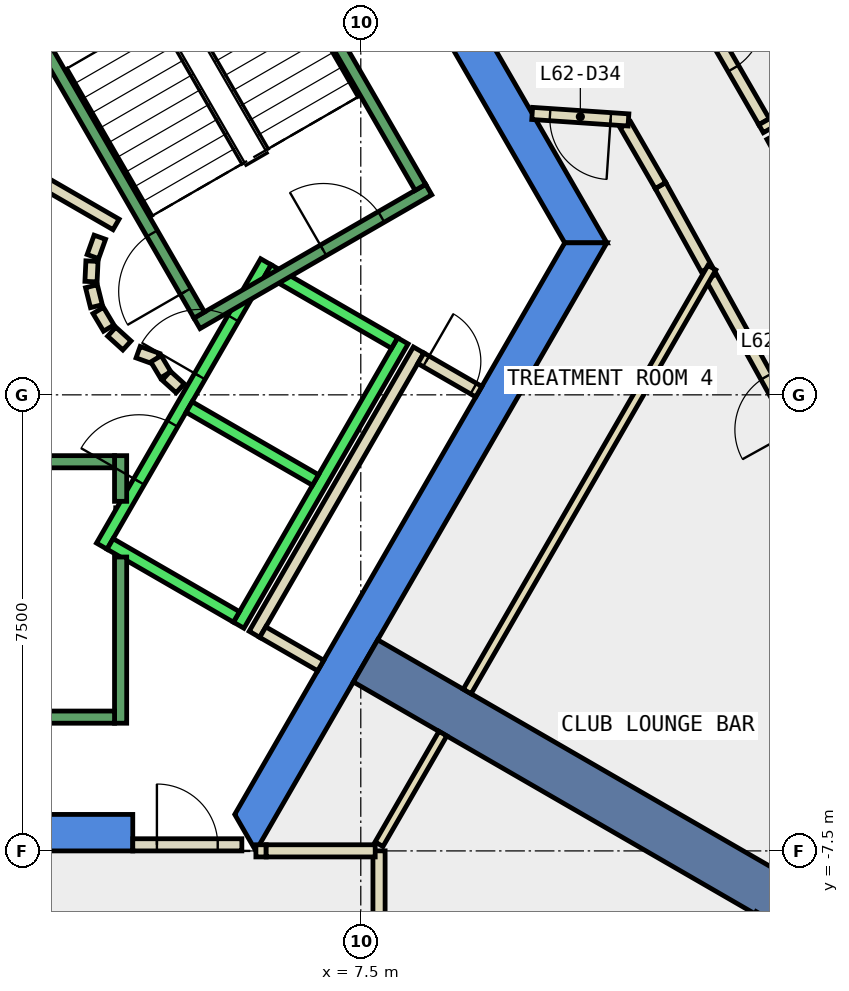
"""IFC4 building model, lengths in metres.
Left out: names, types, materials, properties, quantities, classifications, styles, units other than length and angle.
Written with IfcOpenShell. Run it as: python <this file> out.ifc"""

import sys

from ifc_helpers import new_model, si_unit, direction, frame, frame_2d, origin, place, context, subcontext, project, spatial, polyline, rectangle, outline, extrude, element, fill, save


model = new_model("IFC4")
c1 = context("Model", 3, precision=1e-05, world=origin(), true_north=direction((0.0, 1.0)))
c2 = subcontext(c1, "Body", "Model", "MODEL_VIEW")
j1 = project(units=[si_unit("LENGTHUNIT", "METRE"), si_unit("PLANEANGLEUNIT", "RADIAN")], contexts=[c1])
p1 = place(None, origin())
s1 = spatial("IfcSite", under=j1, at=p1, CompositionType="ELEMENT")
p2 = place(p1, origin())
s2 = spatial("IfcBuilding", under=s1, at=p2, CompositionType="ELEMENT")
p3 = place(p2, frame((0.0, 0.0, 270.2)))
s3 = spatial("IfcBuildingStorey", under=s2, at=p3, CompositionType="ELEMENT", Elevation=270.2)
p4 = place(p3, frame((0.0, 0.0, -0.34)))
e1 = element("IfcWall", 1, at=p4, inside=s3, PredefinedType="SHEAR", context=c2, shape_type="SweptSolid", body=[
    extrude(outline(polyline([(6.786, 10.747), (6.266, 10.447), (10.854, 2.5), (11.547, 2.5), (6.786, 10.747)])), origin(), (0.0, 0.0, 1.0), 3.6),
])
p5 = place(p3, frame((0.0, 0.0, -0.34)))
e2 = element("IfcWall", 2, at=p5, inside=s3, PredefinedType="SHEAR", context=c2, shape_type="SweptSolid", body=[
    extrude(outline(polyline([(3.75, -7.5), (3.75, -6.9), (-5.427, -6.9), (-5.774, -7.5), (3.75, -7.5)])), origin(), (0.0, 0.0, 1.0), 3.6),
])
p6 = place(p3, frame((0.0, 0.0, -0.34)))
e3 = element("IfcWall", 3, at=p6, inside=s3, PredefinedType="SHEAR", context=c2, shape_type="SweptSolid", body=[
    extrude(outline(polyline([(5.774, -7.5), (11.547, 2.5), (10.854, 2.5), (5.427, -6.9), (5.774, -7.5)])), origin(), (0.0, 0.0, 1.0), 3.6),
])
p7 = place(p3, frame((7.578, -4.375, -0.34), z_axis=(0.0, 0.0, 1.0), x_axis=(0.866024315419, -0.5000018851, 0.0)))
e4 = element("IfcWall", 4, at=p7, inside=s3, PredefinedType="SHEAR", context=c2, shape_type="SweptSolid", body=[
    extrude(rectangle(XDim=9.0, YDim=0.8, at=frame_2d((4.5, 0.0))), origin(), (0.0, 0.0, 1.0), 3.6),
])
p8 = place(p3, frame((13.188, 2.071, 0.0), z_axis=(0.0, 0.0, 1.0), x_axis=(-0.484398936474, 0.874847226859, 0.0)))
e5 = element("IfcWall", 5, at=p8, inside=s3, PredefinedType="PARTITIONING", context=c2, shape_type="SweptSolid", body=[
    extrude(rectangle(XDim=1.567, YDim=0.2, at=frame_2d((0.783, 0.0))), origin(), (0.0, 0.0, 1.0), 3.26),
])
p9 = place(p3, frame((12.429, 3.442, 0.0), z_axis=(0.0, 0.0, 1.0), x_axis=(-0.500076612374, 0.865981167091, 0.0)))
e6 = element("IfcWall", 6, at=p9, inside=s3, PredefinedType="PARTITIONING", context=c2, shape_type="SweptSolid", body=[
    extrude(rectangle(XDim=1.154, YDim=0.2, at=frame_2d((0.577, 0.0))), origin(), (0.0, 0.0, 1.0), 3.26),
])
p10 = place(p3, frame((11.902, 4.521, 0.0), z_axis=(0.0, 0.0, 1.0), x_axis=(-0.997726217037, 0.067397298437, 0.0)))
e7 = element("IfcWall", 7, at=p10, inside=s3, PredefinedType="PARTITIONING", context=c2, shape_type="SweptSolid", body=[
    extrude(rectangle(XDim=1.587, YDim=0.2, at=frame_2d((0.793, 0.0))), origin(), (0.0, 0.0, 1.0), 3.26),
])
p11 = place(p10, frame((0.293, 0.0, 0.0)))
e8 = element("IfcOpeningElement", 8, at=p11, cuts=e7, PredefinedType="OPENING", context=c2, shape_type="SweptSolid", body=[
    extrude(rectangle(XDim=1.0, YDim=2.1, at=frame_2d((0.5, 1.05))), frame((0.0, 0.11, 0.0), z_axis=(0.0, -1.0, 0.0), x_axis=(1.0, 0.0, 0.0)), (0.0, 0.0, 1.0), 0.22),
])
p12 = place(p3, frame((15.56, -2.214, 0.0), z_axis=(0.0, 0.0, 1.0), x_axis=(-0.484323615817, 0.874888927329, 0.0)))
e9 = element("IfcWall", 9, at=p12, inside=s3, PredefinedType="PARTITIONING", context=c2, shape_type="SweptSolid", body=[
    extrude(rectangle(XDim=4.747, YDim=0.2, at=frame_2d((2.374, 0.0))), origin(), (0.0, 0.0, 1.0), 3.26),
])
p13 = place(p12, frame((1.874, 0.0, 0.0)))
e10 = element("IfcOpeningElement", 10, at=p13, cuts=e9, PredefinedType="OPENING", context=c2, shape_type="SweptSolid", body=[
    extrude(rectangle(XDim=1.0, YDim=2.1, at=frame_2d((0.5, 1.05))), frame((0.0, 0.11, 0.0), z_axis=(0.0, -1.0, 0.0), x_axis=(1.0, 0.0, 0.0)), (0.0, 0.0, 1.0), 0.22),
])
p14 = place(p3, frame((14.267, 4.25, 0.0), z_axis=(0.0, 0.0, 1.0), x_axis=(0.4843920198, -0.874851056554, 0.0)))
e11 = element("IfcWall", 11, at=p14, inside=s3, PredefinedType="PARTITIONING", context=c2, shape_type="SweptSolid", body=[
    extrude(rectangle(XDim=3.199, YDim=0.2, at=frame_2d((1.6, 0.0))), origin(), (0.0, 0.0, 1.0), 3.26),
])
p15 = place(p3, frame((12.62, 7.111, 0.0), z_axis=(0.0, 0.0, 1.0), x_axis=(0.499950733426, -0.866053845986, 0.0)))
e12 = element("IfcWall", 12, at=p15, inside=s3, PredefinedType="PARTITIONING", context=c2, shape_type="SweptSolid", body=[
    extrude(rectangle(XDim=3.024, YDim=0.2, at=frame_2d((1.512, 0.0))), origin(), (0.0, 0.0, 1.0), 3.26),
])
p16 = place(p15, frame((1.013, 0.0, 0.0)))
e13 = element("IfcOpeningElement", 13, at=p16, cuts=e12, PredefinedType="OPENING", context=c2, shape_type="SweptSolid", body=[
    extrude(rectangle(XDim=1.0, YDim=2.1, at=frame_2d((0.5, 1.05))), frame((0.0, 0.11, 0.0), z_axis=(0.0, -1.0, 0.0), x_axis=(1.0, 0.0, 0.0)), (0.0, 0.0, 1.0), 0.22),
])
p17 = place(p3, frame((5.751, -3.938, 0.0), z_axis=(0.0, 0.0, 1.0), x_axis=(0.500034260056, 0.866005622828, 0.0)))
e14 = element("IfcWall", 14, at=p17, inside=s3, PredefinedType="PARTITIONING", context=c2, shape_type="SweptSolid", body=[
    extrude(rectangle(XDim=5.399, YDim=0.2, at=frame_2d((2.7, 0.0))), origin(), (0.0, 0.0, 1.0), 3.26),
])
p18 = place(p3, frame((8.488, 0.602, 0.0), z_axis=(0.0, 0.0, 1.0), x_axis=(0.866063652425, -0.499933745558, 0.0)))
e15 = element("IfcWall", 15, at=p18, inside=s3, PredefinedType="PARTITIONING", context=c2, shape_type="SweptSolid", body=[
    extrude(rectangle(XDim=1.1, YDim=0.2, at=frame_2d((0.55, 0.0))), origin(), (0.0, 0.0, 1.0), 3.26),
])
p19 = place(p18, frame((0.1, 0.0, 0.0)))
e16 = element("IfcOpeningElement", 16, at=p19, cuts=e15, PredefinedType="OPENING", context=c2, shape_type="SweptSolid", body=[
    extrude(rectangle(XDim=0.9, YDim=2.1, at=frame_2d((0.45, 1.05))), frame((0.0, 0.11, 0.0), z_axis=(0.0, -1.0, 0.0), x_axis=(1.0, 0.0, 0.0)), (0.0, 0.0, 1.0), 0.22),
])
p20 = place(p3, frame((6.841, -4.452, 0.0), z_axis=(0.0, 0.0, 1.0), x_axis=(-0.86621513555, 0.499671230855, 0.0)))
e17 = element("IfcWall", 17, at=p20, inside=s3, PredefinedType="PARTITIONING", context=c2, shape_type="SweptSolid", body=[
    extrude(rectangle(XDim=1.1, YDim=0.2, at=frame_2d((0.55, 0.0))), origin(), (0.0, 0.0, 1.0), 3.26),
])
p21 = place(p3, frame((5.775, -7.499, 0.0), z_axis=(0.0, 0.0, 1.0), x_axis=(1.0, 0.0, 0.0)))
e18 = element("IfcWall", 18, at=p21, inside=s3, PredefinedType="PARTITIONING", context=c2, shape_type="SweptSolid", body=[
    extrude(rectangle(XDim=0.169, YDim=0.2, at=frame_2d((0.084, 0.0))), origin(), (0.0, 0.0, 1.0), 2.4),
])
p22 = place(p3, frame((7.8, -7.39, 0.0), z_axis=(0.0, 0.0, 1.0), x_axis=(0.499977374825, 0.866038466041, 0.0)))
e19 = element("IfcWall", 19, at=p22, inside=s3, PredefinedType="PARTITIONING", context=c2, shape_type="SweptSolid", body=[
    extrude(rectangle(XDim=2.1, YDim=0.15, at=frame_2d((1.05, 0.0))), origin(), (0.0, 0.0, 1.0), 3.26),
])
p23 = place(p3, frame((1.866, 3.732, 0.0), z_axis=(0.0, 0.0, 1.0), x_axis=(0.866043361281, -0.499968895414, 0.0)))
e20 = element("IfcWall", 20, at=p23, inside=s3, PredefinedType="PARTITIONING", context=c2, shape_type="SweptSolid", body=[
    extrude(rectangle(XDim=1.858, YDim=0.2, at=frame_2d((0.929, 0.0))), origin(), (0.0, 0.0, 1.0), 3.26),
])
p24 = place(p3, frame((3.208, 2.592, 0.0), z_axis=(0.0, 0.0, 1.0), x_axis=(-0.337388820924, -0.941365382578, 0.0)))
e21 = element("IfcWall", 21, at=p24, inside=s3, PredefinedType="PARTITIONING", context=c2, shape_type="SweptSolid", body=[
    extrude(rectangle(XDim=0.338, YDim=0.2, at=frame_2d((0.169, 0.0))), origin(), (0.0, 0.0, 1.0), 3.26),
])
p25 = place(p3, frame((3.079, 2.199, 0.0), z_axis=(0.0, 0.0, 1.0), x_axis=(-0.047771483479, -0.998858290933, 0.0)))
e22 = element("IfcWall", 22, at=p25, inside=s3, PredefinedType="PARTITIONING", context=c2, shape_type="SweptSolid", body=[
    extrude(rectangle(XDim=0.337, YDim=0.2, at=frame_2d((0.169, 0.0))), origin(), (0.0, 0.0, 1.0), 3.26),
])
p26 = place(p3, frame((3.07, 1.786, 0.0), z_axis=(0.0, 0.0, 1.0), x_axis=(0.242705583207, -0.970099994784, 0.0)))
e23 = element("IfcWall", 23, at=p26, inside=s3, PredefinedType="PARTITIONING", context=c2, shape_type="SweptSolid", body=[
    extrude(rectangle(XDim=0.338, YDim=0.2, at=frame_2d((0.169, 0.0))), origin(), (0.0, 0.0, 1.0), 3.26),
])
for number, where, z_axis, x_axis in (
    (24, (3.182, 1.388, 0.0), (0.0, 0.0, 1.0), (0.512, -0.859, 0.0)),
    (25, (3.404, 1.039, 0.0), (0.0, 0.0, 1.0), (0.74, -0.672, 0.0)),
):
    element("IfcWall", number, at=place(p3, frame(where, z_axis=z_axis, x_axis=x_axis)), inside=s3, PredefinedType="PARTITIONING", context=c2, shape_type="SweptSolid", body=[
        extrude(rectangle(XDim=0.338, YDim=0.2, at=frame_2d((0.169, 0.0))), origin(), (0.0, 0.0, 1.0), 3.26),
    ])
p27 = place(p3, frame((3.838, 0.702, 0.0), z_axis=(0.0, 0.0, 1.0), x_axis=(0.941035081519, -0.338308993895, 0.0)))
e26 = element("IfcWall", 26, at=p27, inside=s3, PredefinedType="PARTITIONING", context=c2, shape_type="SweptSolid", body=[
    extrude(rectangle(XDim=0.337, YDim=0.2, at=frame_2d((0.168, 0.0))), origin(), (0.0, 0.0, 1.0), 3.26),
])
p28 = place(p3, frame((4.132, 0.593, 0.0), z_axis=(0.0, 0.0, 1.0), x_axis=(0.513561617048, -0.858052717201, 0.0)))
e27 = element("IfcWall", 27, at=p28, inside=s3, PredefinedType="PARTITIONING", context=c2, shape_type="SweptSolid", body=[
    extrude(rectangle(XDim=0.308, YDim=0.2, at=frame_2d((0.154, 0.0))), origin(), (0.0, 0.0, 1.0), 3.26),
])
p29 = place(p3, frame((4.301, 0.315, 0.0), z_axis=(0.0, 0.0, 1.0), x_axis=(0.741798017506, -0.670623367639, 0.0)))
e28 = element("IfcWall", 28, at=p29, inside=s3, PredefinedType="PARTITIONING", context=c2, shape_type="SweptSolid", body=[
    extrude(rectangle(XDim=0.309, YDim=0.2, at=frame_2d((0.154, 0.0))), origin(), (0.0, 0.0, 1.0), 3.26),
])
p30 = place(p3, frame((7.8, -7.499, 0.0), z_axis=(0.0, 0.0, 1.0), x_axis=(0.0, -1.0, 0.0)))
e29 = element("IfcWall", 29, at=p30, inside=s3, PredefinedType="PARTITIONING", context=c2, shape_type="SweptSolid", body=[
    extrude(rectangle(XDim=5.465, YDim=0.2, at=frame_2d((2.732, 0.0))), origin(), (0.0, 0.0, 1.0), 3.26),
])
p31 = place(p3, frame((14.067, -8.536, 0.0), z_axis=(0.0, 0.0, 1.0), x_axis=(-0.500100941679, -0.865967117235, 0.0)))
e30 = element("IfcWall", 30, at=p31, inside=s3, PredefinedType="PARTITIONING", context=c2, shape_type="SweptSolid", body=[
    extrude(rectangle(XDim=4.951, YDim=0.15, at=frame_2d((2.475, 0.0))), origin(), (0.0, 0.0, 1.0), 3.26),
])
p32 = place(p3, frame((14.083, 4.377, 0.0), z_axis=(0.0, 0.0, 1.0), x_axis=(0.870415885751, 0.492317159799, 0.0)))
e31 = element("IfcWall", 31, at=p32, inside=s3, PredefinedType="PARTITIONING", context=c2, shape_type="SweptSolid", body=[
    extrude(rectangle(XDim=4.581, YDim=0.15, at=frame_2d((2.29, 0.0))), origin(), (0.0, 0.0, 1.0), 3.26),
])
p33 = place(p3, frame((3.75, -7.4, 0.0), z_axis=(0.0, 0.0, 1.0), x_axis=(1.0, 0.0, 0.0)))
e32 = element("IfcWall", 32, at=p33, inside=s3, PredefinedType="PARTITIONING", context=c2, shape_type="SweptSolid", body=[
    extrude(rectangle(XDim=1.794, YDim=0.2, at=frame_2d((0.897, 0.0))), origin(), (0.0, 0.0, 1.0), 2.4),
])
p34 = place(p33, frame((0.397, 0.0, 0.0)))
e33 = element("IfcOpeningElement", 33, at=p34, cuts=e32, PredefinedType="OPENING", context=c2, shape_type="SweptSolid", body=[
    extrude(rectangle(XDim=1.0, YDim=2.1, at=frame_2d((0.5, 1.05))), frame((0.0, 0.11, 0.0), z_axis=(0.0, -1.0, 0.0), x_axis=(1.0, 0.0, 0.0)), (0.0, 0.0, 1.0), 0.22),
])
p35 = place(p3, frame((9.25, -4.878, 0.0), z_axis=(0.0, 0.0, 1.0), x_axis=(0.499982416899, 0.866035555154, 0.0)))
e34 = element("IfcWall", 34, at=p35, inside=s3, PredefinedType="PARTITIONING", context=c2, shape_type="SweptSolid", body=[
    extrude(rectangle(XDim=8.048, YDim=0.15, at=frame_2d((4.024, 0.0))), origin(), (0.0, 0.0, 1.0), 3.26),
])
p36 = place(p3, frame((5.944, -7.499, 0.0), z_axis=(0.0, 0.0, 1.0), x_axis=(1.0, 0.0, 0.0)))
e35 = element("IfcWall", 35, at=p36, inside=s3, PredefinedType="PARTITIONING", context=c2, shape_type="SweptSolid", body=[
    extrude(rectangle(XDim=1.793, YDim=0.2, at=frame_2d((0.896, 0.0))), origin(), (0.0, 0.0, 1.0), 3.26),
])
p37 = place(p3, frame((3.24, -2.488, 0.0), z_axis=(0.0, 0.0, 1.0), x_axis=(0.500034260056, 0.866005622828, 0.0)))
e36 = element("IfcWall", 36, at=p37, inside=s3, PredefinedType="STANDARD", context=c2, shape_type="SweptSolid", body=[
    extrude(rectangle(XDim=5.399, YDim=0.2, at=frame_2d((2.7, 0.0))), origin(), (0.0, 0.0, 1.0), 3.26),
])
p38 = place(p37, frame((3.225, 0.0, 0.0)))
e37 = element("IfcOpeningElement", 37, at=p38, cuts=e36, PredefinedType="OPENING", context=c2, shape_type="SweptSolid", body=[
    extrude(rectangle(XDim=1.1, YDim=2.1, at=frame_2d((0.55, 1.05))), frame((0.0, 0.11, 0.0), z_axis=(0.0, -1.0, 0.0), x_axis=(1.0, 0.0, 0.0)), (0.0, 0.0, 1.0), 0.22),
])
p39 = place(p37, frame((1.225, 0.0, 0.0)))
e38 = element("IfcOpeningElement", 38, at=p39, cuts=e36, PredefinedType="OPENING", context=c2, shape_type="SweptSolid", body=[
    extrude(rectangle(XDim=1.1, YDim=2.1, at=frame_2d((0.55, 1.05))), frame((0.0, 0.11, 0.0), z_axis=(0.0, -1.0, 0.0), x_axis=(1.0, 0.0, 0.0)), (0.0, 0.0, 1.0), 0.22),
])
p40 = place(p3, frame((5.492, -3.788, 0.0), z_axis=(0.0, 0.0, 1.0), x_axis=(0.500034260056, 0.866005622828, 0.0)))
e39 = element("IfcWall", 39, at=p40, inside=s3, PredefinedType="STANDARD", context=c2, shape_type="SweptSolid", body=[
    extrude(rectangle(XDim=5.399, YDim=0.2, at=frame_2d((2.7, 0.0))), origin(), (0.0, 0.0, 1.0), 3.26),
])
p41 = place(p3, frame((3.377, -2.452, 0.0), z_axis=(0.0, 0.0, 1.0), x_axis=(0.865955154139, -0.50012165622, 0.0)))
e40 = element("IfcWall", 40, at=p41, inside=s3, PredefinedType="STANDARD", context=c2, shape_type="SweptSolid", body=[
    extrude(rectangle(XDim=2.4, YDim=0.2, at=frame_2d((1.2, 0.0))), origin(), (0.0, 0.0, 1.0), 3.26),
])
for number, where, z_axis, x_axis in (
    (41, (4.677, -0.2, 0.0), (0.0, 0.0, 1.0), (0.866, -0.5, 0.0)),
    (42, (5.977, 2.052, 0.0), (0.0, 0.0, 1.0), (0.866, -0.5, 0.0)),
):
    element("IfcWall", number, at=place(p3, frame(where, z_axis=z_axis, x_axis=x_axis)), inside=s3, PredefinedType="STANDARD", context=c2, shape_type="SweptSolid", body=[
        extrude(rectangle(XDim=2.399, YDim=0.2, at=frame_2d((1.2, 0.0))), origin(), (0.0, 0.0, 1.0), 3.26),
    ])
p42 = place(p3, frame((3.55, -2.667, 0.0), z_axis=(0.0, 0.0, 1.0), x_axis=(0.0, -1.0, 0.0)))
e43 = element("IfcWall", 43, at=p42, inside=s3, PredefinedType="STANDARD", context=c2, shape_type="SweptSolid", body=[
    extrude(rectangle(XDim=2.733, YDim=0.2, at=frame_2d((1.366, 0.0))), origin(), (0.0, 0.0, 1.0), 3.26),
])
p43 = place(p3, frame((3.55, -1.0, 0.0), z_axis=(0.0, 0.0, 1.0), x_axis=(0.0, -1.0, 0.0)))
e44 = element("IfcWall", 44, at=p43, inside=s3, PredefinedType="STANDARD", context=c2, shape_type="SweptSolid", body=[
    extrude(rectangle(XDim=0.751, YDim=0.2, at=frame_2d((0.375, 0.0))), origin(), (0.0, 0.0, 1.0), 3.26),
])
p44 = place(p3, frame((-3.45, -1.1, 0.0), z_axis=(0.0, 0.0, 1.0), x_axis=(1.0, 0.0, 0.0)))
e45 = element("IfcWall", 45, at=p44, inside=s3, PredefinedType="STANDARD", context=c2, shape_type="SweptSolid", body=[
    extrude(rectangle(XDim=6.9, YDim=0.2, at=frame_2d((3.45, 0.0))), origin(), (0.0, 0.0, 1.0), 3.26),
])
p45 = place(p44, frame((0.45, 0.0, 0.0)))
e46 = element("IfcOpeningElement", 46, at=p45, cuts=e45, PredefinedType="OPENING", context=c2, shape_type="SweptSolid", body=[
    extrude(rectangle(XDim=1.1, YDim=2.2, at=frame_2d((0.55, 1.1))), frame((0.0, 0.11, 0.0), z_axis=(0.0, -1.0, 0.0), x_axis=(1.0, 0.0, 0.0)), (0.0, 0.0, 1.0), 0.22),
])
p46 = place(p3, frame((-3.45, -5.3, 0.0), z_axis=(0.0, 0.0, 1.0), x_axis=(1.0, 0.0, 0.0)))
e47 = element("IfcWall", 47, at=p46, inside=s3, PredefinedType="STANDARD", context=c2, shape_type="SweptSolid", body=[
    extrude(rectangle(XDim=6.9, YDim=0.2, at=frame_2d((3.45, 0.0))), origin(), (0.0, 0.0, 1.0), 3.26),
])
p47 = place(p3, frame((4.806, 1.176, 0.0), z_axis=(0.0, 0.0, 1.0), x_axis=(0.866059941101, 0.499940174841, 0.0)))
e48 = element("IfcWall", 48, at=p47, inside=s3, PredefinedType="STANDARD", context=c2, shape_type="SweptSolid", body=[
    extrude(rectangle(XDim=4.4, YDim=0.2, at=frame_2d((2.2, 0.0))), origin(), (0.0, 0.0, 1.0), 3.26),
])
p48 = place(p47, frame((2.4, 0.0, 0.0)))
e49 = element("IfcOpeningElement", 49, at=p48, cuts=e48, PredefinedType="OPENING", context=c2, shape_type="SweptSolid", body=[
    extrude(rectangle(XDim=1.1, YDim=2.2, at=frame_2d((0.55, 1.1))), frame((0.0, 0.11, 0.0), z_axis=(0.0, -1.0, 0.0), x_axis=(1.0, 0.0, 0.0)), (0.0, 0.0, 1.0), 0.22),
])
p49 = place(p3, frame((4.843, 1.312, 0.0), z_axis=(0.0, 0.0, 1.0), x_axis=(-0.499963383562, 0.866046543262, 0.0)))
e50 = element("IfcWall", 50, at=p49, inside=s3, PredefinedType="STANDARD", context=c2, shape_type="SweptSolid", body=[
    extrude(rectangle(XDim=6.9, YDim=0.2, at=frame_2d((3.45, 0.0))), origin(), (0.0, 0.0, 1.0), 3.26),
])
p50 = place(p49, frame((0.45, 0.0, 0.0)))
e51 = element("IfcOpeningElement", 51, at=p50, cuts=e50, PredefinedType="OPENING", context=c2, shape_type="SweptSolid", body=[
    extrude(rectangle(XDim=1.1, YDim=2.2, at=frame_2d((0.55, 1.1))), frame((0.0, 0.11, 0.0), z_axis=(0.0, -1.0, 0.0), x_axis=(1.0, 0.0, 0.0)), (0.0, 0.0, 1.0), 0.22),
])
p51 = place(p3, frame((8.48, 3.412, 0.0), z_axis=(0.0, 0.0, 1.0), x_axis=(-0.499978703459, 0.866037698999, 0.0)))
e52 = element("IfcWall", 52, at=p51, inside=s3, PredefinedType="STANDARD", context=c2, shape_type="SweptSolid", body=[
    extrude(rectangle(XDim=6.9, YDim=0.2, at=frame_2d((3.45, 0.0))), origin(), (0.0, 0.0, 1.0), 3.26),
])
p52 = place(p16, origin())
e53 = element("IfcDoor", 53, at=p52, inside=s3, OperationType="SINGLE_SWING_LEFT", PredefinedType="DOOR", context=c2, shape_type="SweptSolid", body=[
    extrude(rectangle(XDim=1.0, YDim=2.1, at=frame_2d((0.5, 1.05))), frame((0.0, 0.025, 0.0), z_axis=(0.0, -1.0, 0.0), x_axis=(1.0, 0.0, 0.0)), (0.0, 0.0, 1.0), 0.05),
])
fill(e13, e53)
p53 = place(p13, origin())
e54 = element("IfcDoor", 54, at=p53, inside=s3, OperationType="SINGLE_SWING_LEFT", PredefinedType="DOOR", context=c2, shape_type="SweptSolid", body=[
    extrude(rectangle(XDim=1.0, YDim=2.1, at=frame_2d((0.5, 1.05))), frame((0.0, 0.025, 0.0), z_axis=(0.0, -1.0, 0.0), x_axis=(1.0, 0.0, 0.0)), (0.0, 0.0, 1.0), 0.05),
])
fill(e10, e54)
p54 = place(p11, origin())
e55 = element("IfcDoor", 55, at=p54, inside=s3, OperationType="SINGLE_SWING_LEFT", PredefinedType="DOOR", context=c2, shape_type="SweptSolid", body=[
    extrude(rectangle(XDim=1.0, YDim=2.1, at=frame_2d((0.5, 1.05))), frame((0.0, 0.025, 0.0), z_axis=(0.0, -1.0, 0.0), x_axis=(1.0, 0.0, 0.0)), (0.0, 0.0, 1.0), 0.05),
])
fill(e8, e55)
p55 = place(p19, origin())
e56 = element("IfcDoor", 56, at=p55, inside=s3, OperationType="SINGLE_SWING_RIGHT", PredefinedType="DOOR", context=c2, shape_type="SweptSolid", body=[
    extrude(rectangle(XDim=0.9, YDim=2.1, at=frame_2d((0.45, 1.05))), frame((0.0, 0.025, 0.0), z_axis=(0.0, -1.0, 0.0), x_axis=(1.0, 0.0, 0.0)), (0.0, 0.0, 1.0), 0.05),
])
fill(e16, e56)
p56 = place(p34, origin())
e57 = element("IfcDoor", 57, at=p56, inside=s3, OperationType="SINGLE_SWING_LEFT", PredefinedType="DOOR", context=c2, shape_type="SweptSolid", body=[
    extrude(rectangle(XDim=1.0, YDim=2.1, at=frame_2d((0.5, 1.05))), frame((0.0, 0.025, 0.0), z_axis=(0.0, -1.0, 0.0), x_axis=(1.0, 0.0, 0.0)), (0.0, 0.0, 1.0), 0.05),
])
fill(e33, e57)
p57 = place(p38, origin())
e58 = element("IfcDoor", 58, at=p57, inside=s3, OperationType="SLIDING_TO_LEFT", PredefinedType="DOOR", context=c2, shape_type="SweptSolid", body=[
    extrude(rectangle(XDim=1.1, YDim=2.1, at=frame_2d((0.55, 1.05))), frame((0.0, 0.025, 0.0), z_axis=(0.0, -1.0, 0.0), x_axis=(1.0, 0.0, 0.0)), (0.0, 0.0, 1.0), 0.05),
])
fill(e37, e58)
p58 = place(p39, origin())
e59 = element("IfcDoor", 59, at=p58, inside=s3, OperationType="SLIDING_TO_LEFT", PredefinedType="DOOR", context=c2, shape_type="SweptSolid", body=[
    extrude(rectangle(XDim=1.1, YDim=2.1, at=frame_2d((0.55, 1.05))), frame((0.0, 0.025, 0.0), z_axis=(0.0, -1.0, 0.0), x_axis=(1.0, 0.0, 0.0)), (0.0, 0.0, 1.0), 0.05),
])
fill(e38, e59)
p59 = place(p50, origin())
e60 = element("IfcDoor", 60, at=p59, inside=s3, OperationType="SINGLE_SWING_LEFT", PredefinedType="DOOR", context=c2, shape_type="SweptSolid", body=[
    extrude(rectangle(XDim=1.1, YDim=2.2, at=frame_2d((0.55, 1.1))), frame((0.0, 0.025, 0.0), z_axis=(0.0, -1.0, 0.0), x_axis=(1.0, 0.0, 0.0)), (0.0, 0.0, 1.0), 0.05),
])
fill(e51, e60)
p60 = place(p48, origin())
e61 = element("IfcDoor", 61, at=p60, inside=s3, OperationType="SINGLE_SWING_LEFT", PredefinedType="DOOR", context=c2, shape_type="SweptSolid", body=[
    extrude(rectangle(XDim=1.1, YDim=2.2, at=frame_2d((0.55, 1.1))), frame((0.0, 0.025, 0.0), z_axis=(0.0, -1.0, 0.0), x_axis=(1.0, 0.0, 0.0)), (0.0, 0.0, 1.0), 0.05),
])
fill(e49, e61)
save(model, sys.argv[1])
